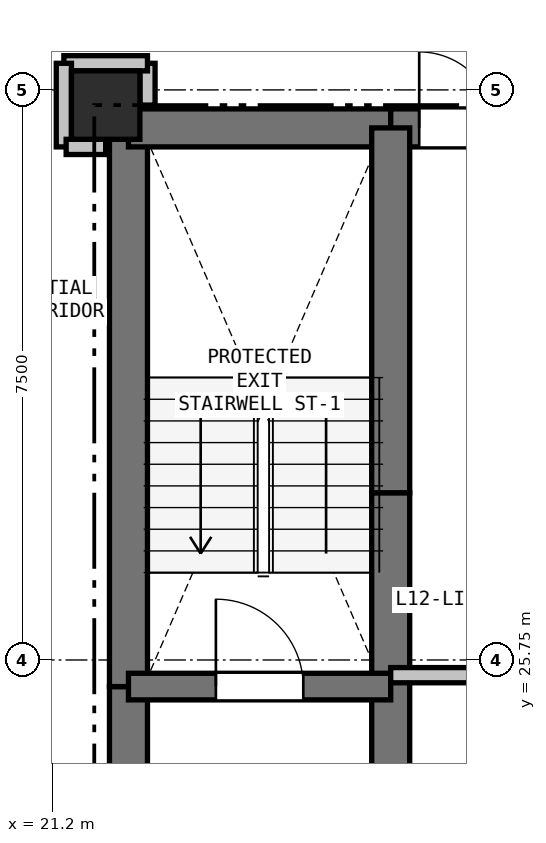
"""IFC4 building model, lengths in metres.
Left out: names, types, materials, properties, quantities, classifications, styles, units other than length and angle.
Written with IfcOpenShell. Run it as: python <this file> out.ifc"""

import sys

from ifc_helpers import new_model, si_unit, direction, frame, frame_2d, origin, origin_2d, place, context, subcontext, project, spatial, rectangle, extrude, element, fill, save


model = new_model("IFC4")
c1 = context("Model", 3, precision=1e-05, world=origin(), true_north=direction((0.0, 1.0)))
c2 = subcontext(c1, "Body", "Model", "MODEL_VIEW")
j1 = project(units=[si_unit("LENGTHUNIT", "METRE"), si_unit("PLANEANGLEUNIT", "RADIAN")], contexts=[c1])
p1 = place(None, origin())
s1 = spatial("IfcSite", under=j1, at=p1, CompositionType="ELEMENT")
p2 = place(p1, origin())
s2 = spatial("IfcBuilding", under=s1, at=p2, CompositionType="ELEMENT")
p3 = place(p2, frame((0.0, 0.0, 45.6)))
s3 = spatial("IfcBuildingStorey", under=s2, at=p3, CompositionType="ELEMENT", Elevation=45.6)
p4 = place(p3, frame((21.9, 33.05, 0.0), z_axis=(0.0, 0.0, 1.0), x_axis=(1.0, 0.0, 0.0)))
e1 = element("IfcColumn", 1, at=p4, inside=s3, PredefinedType="COLUMN", context=c2, shape_type="SweptSolid", body=[
    extrude(rectangle(XDim=0.9, YDim=0.9, at=origin_2d()), origin(), (0.0, 0.0, 1.0), 3.3),
])
p5 = place(p3, frame((22.2, 20.75, 0.0), z_axis=(0.0, 0.0, 1.0), x_axis=(0.0, 1.0, 0.0)))
e2 = element("IfcWall", 2, at=p5, inside=s3, PredefinedType="SHEAR", context=c2, shape_type="SweptSolid", body=[
    extrude(rectangle(XDim=4.65, YDim=0.5, at=frame_2d((2.325, 0.0))), origin(), (0.0, 0.0, 1.0), 3.04),
])
p6 = place(p3, frame((22.2, 25.4, 0.0), z_axis=(0.0, 0.0, 1.0), x_axis=(0.0, 1.0, 0.0)))
e3 = element("IfcWall", 3, at=p6, inside=s3, PredefinedType="SHEAR", context=c2, shape_type="SweptSolid", body=[
    extrude(rectangle(XDim=7.35, YDim=0.5, at=frame_2d((3.675, 0.0))), origin(), (0.0, 0.0, 1.0), 3.04),
])
p7 = place(p3, frame((22.2, 32.75, 0.0), z_axis=(0.0, 0.0, 1.0), x_axis=(1.0, 0.0, 0.0)))
e4 = element("IfcWall", 4, at=p7, inside=s3, PredefinedType="SHEAR", context=c2, shape_type="SweptSolid", body=[
    extrude(rectangle(XDim=3.45, YDim=0.5, at=frame_2d((1.725, 0.0))), origin(), (0.0, 0.0, 1.0), 3.04),
])
p8 = place(p3, frame((25.65, 32.75, 0.0), z_axis=(0.0, 0.0, 1.0), x_axis=(1.0, 0.0, 0.0)))
e5 = element("IfcWall", 5, at=p8, inside=s3, PredefinedType="SHEAR", context=c2, shape_type="SweptSolid", body=[
    extrude(rectangle(XDim=1.75, YDim=0.5, at=frame_2d((0.875, 0.0))), origin(), (0.0, 0.0, 1.0), 3.04),
])
p9 = place(p8, frame((0.375, 0.0, 0.0)))
e6 = element("IfcOpeningElement", 6, at=p9, cuts=e5, PredefinedType="OPENING", context=c2, shape_type="SweptSolid", body=[
    extrude(rectangle(XDim=1.0, YDim=2.15, at=frame_2d((0.5, 1.075))), frame((0.0, 0.26, 0.0), z_axis=(0.0, -1.0, 0.0), x_axis=(1.0, 0.0, 0.0)), (0.0, 0.0, 1.0), 0.52),
])
p10 = place(p3, frame((25.65, 22.75, 0.0), z_axis=(0.0, 0.0, 1.0), x_axis=(0.0, 1.0, 0.0)))
e7 = element("IfcWall", 7, at=p10, inside=s3, PredefinedType="SHEAR", context=c2, shape_type="SweptSolid", body=[
    extrude(rectangle(XDim=2.8, YDim=0.5, at=frame_2d((1.4, 0.0))), origin(), (0.0, 0.0, 1.0), 3.04),
])
p11 = place(p3, frame((25.65, 25.55, 0.0), z_axis=(0.0, 0.0, 1.0), x_axis=(0.0, 1.0, 0.0)))
e8 = element("IfcWall", 8, at=p11, inside=s3, PredefinedType="SHEAR", context=c2, shape_type="SweptSolid", body=[
    extrude(rectangle(XDim=2.4, YDim=0.5, at=frame_2d((1.2, 0.0))), origin(), (0.0, 0.0, 1.0), 3.04),
])
p12 = place(p3, frame((25.65, 27.95, 0.0), z_axis=(0.0, 0.0, 1.0), x_axis=(0.0, 1.0, 0.0)))
e9 = element("IfcWall", 9, at=p12, inside=s3, PredefinedType="SHEAR", context=c2, shape_type="SweptSolid", body=[
    extrude(rectangle(XDim=4.8, YDim=0.5, at=frame_2d((2.4, 0.0))), origin(), (0.0, 0.0, 1.0), 3.04),
])
p13 = place(p3, frame((22.2, 25.4, 0.0), z_axis=(0.0, 0.0, 1.0), x_axis=(1.0, 0.0, 0.0)))
e10 = element("IfcWall", 10, at=p13, inside=s3, PredefinedType="SHEAR", context=c2, shape_type="SweptSolid", body=[
    extrude(rectangle(XDim=3.45, YDim=0.35, at=frame_2d((1.725, 0.0))), origin(), (0.0, 0.0, 1.0), 3.04),
])
p14 = place(p13, frame((1.15, 0.0, 0.0)))
e11 = element("IfcOpeningElement", 11, at=p14, cuts=e10, PredefinedType="OPENING", context=c2, shape_type="SweptSolid", body=[
    extrude(rectangle(XDim=1.15, YDim=2.15, at=frame_2d((0.575, 1.075))), frame((0.0, 0.185, 0.0), z_axis=(0.0, -1.0, 0.0), x_axis=(1.0, 0.0, 0.0)), (0.0, 0.0, 1.0), 0.37),
])
p15 = place(p3, frame((25.65, 25.55, 0.0), z_axis=(0.0, 0.0, 1.0), x_axis=(1.0, 0.0, 0.0)))
e12 = element("IfcWall", 12, at=p15, inside=s3, PredefinedType="PARTITIONING", context=c2, shape_type="SweptSolid", body=[
    extrude(rectangle(XDim=4.95, YDim=0.2, at=frame_2d((2.475, 0.0))), origin(), (0.0, 0.0, 1.0), 3.04),
])
p16 = place(p3, frame((22.45, 33.05, 0.0), z_axis=(0.0, 0.0, 1.0), x_axis=(0.0, 1.0, 0.0)))
e13 = element("IfcWall", 13, at=p16, inside=s3, PredefinedType="PARTITIONING", context=c2, shape_type="SweptSolid", body=[
    extrude(rectangle(XDim=0.55, YDim=0.2, at=frame_2d((0.275, 0.0))), origin(), (0.0, 0.0, 1.0), 2.488),
])
p17 = place(p3, frame((22.45, 33.6, 0.0), z_axis=(0.0, 0.0, 1.0), x_axis=(-1.0, 0.0, 0.0)))
e14 = element("IfcWall", 14, at=p17, inside=s3, PredefinedType="PARTITIONING", context=c2, shape_type="SweptSolid", body=[
    extrude(rectangle(XDim=1.1, YDim=0.2, at=frame_2d((0.55, 0.0))), origin(), (0.0, 0.0, 1.0), 3.04),
])
p18 = place(p3, frame((21.35, 33.6, 0.0), z_axis=(0.0, 0.0, 1.0), x_axis=(0.0, -1.0, 0.0)))
e15 = element("IfcWall", 15, at=p18, inside=s3, PredefinedType="PARTITIONING", context=c2, shape_type="SweptSolid", body=[
    extrude(rectangle(XDim=1.1, YDim=0.2, at=frame_2d((0.55, 0.0))), origin(), (0.0, 0.0, 1.0), 2.337),
])
p19 = place(p3, frame((21.38, 32.5, 0.0), z_axis=(0.0, 0.0, 1.0), x_axis=(1.0, 0.0, 0.0)))
e16 = element("IfcWall", 16, at=p19, inside=s3, PredefinedType="PARTITIONING", context=c2, shape_type="SweptSolid", body=[
    extrude(rectangle(XDim=0.52, YDim=0.2, at=frame_2d((0.26, 0.0))), origin(), (0.0, 0.0, 1.0), 2.488),
])
p20 = place(p9, origin())
e17 = element("IfcDoor", 17, at=p20, inside=s3, OperationType="SINGLE_SWING_LEFT", PredefinedType="DOOR", context=c2, shape_type="SweptSolid", body=[
    extrude(rectangle(XDim=1.0, YDim=2.15, at=frame_2d((0.5, 1.075))), frame((0.0, 0.025, 0.0), z_axis=(0.0, -1.0, 0.0), x_axis=(1.0, 0.0, 0.0)), (0.0, 0.0, 1.0), 0.05),
])
fill(e6, e17)
p21 = place(p14, origin())
e18 = element("IfcDoor", 18, at=p21, inside=s3, OperationType="SINGLE_SWING_LEFT", PredefinedType="DOOR", context=c2, shape_type="SweptSolid", body=[
    extrude(rectangle(XDim=1.15, YDim=2.15, at=frame_2d((0.575, 1.075))), frame((0.0, 0.025, 0.0), z_axis=(0.0, -1.0, 0.0), x_axis=(1.0, 0.0, 0.0)), (0.0, 0.0, 1.0), 0.05),
])
fill(e11, e18)
save(model, sys.argv[1])
